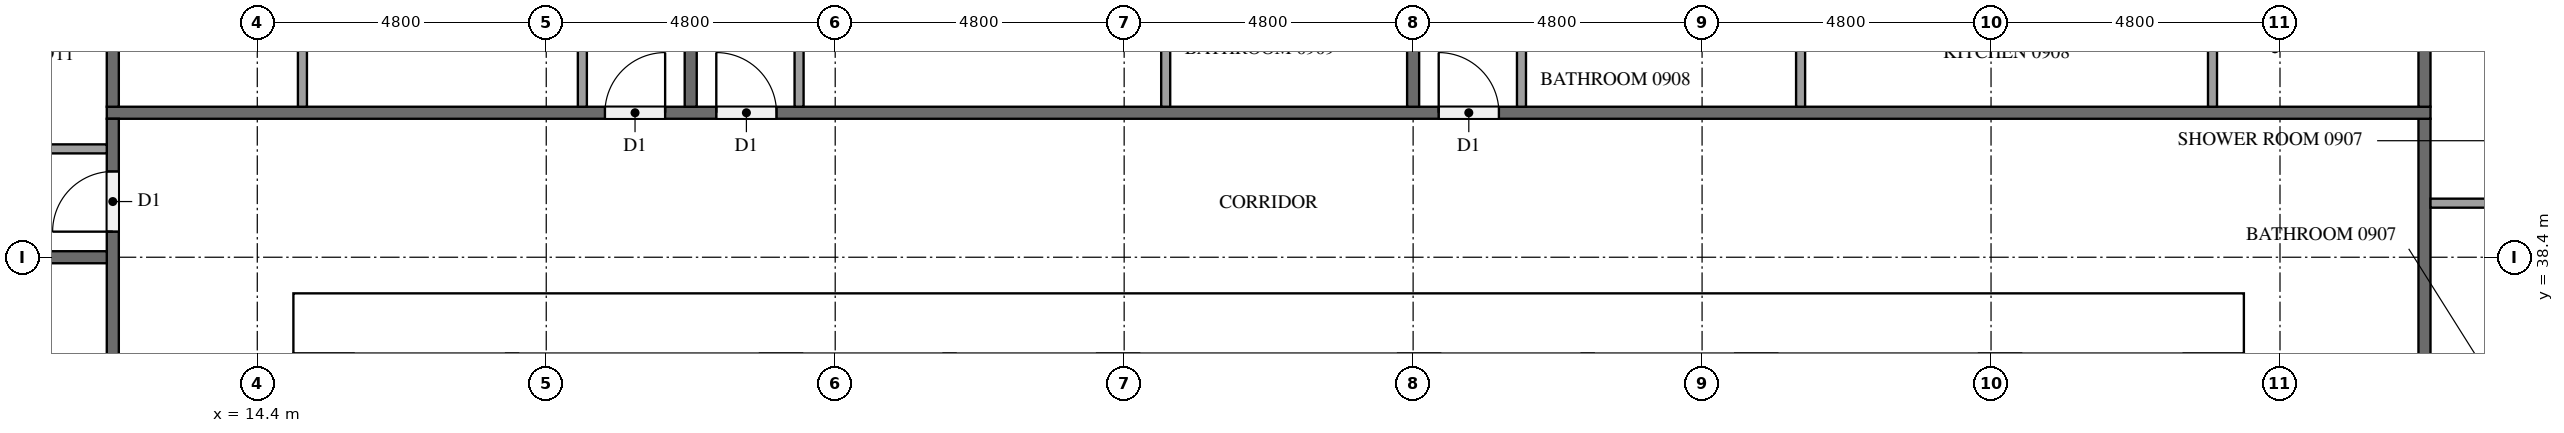
"""IFC4 building model, lengths in metres.
Left out: names, types, materials, properties, quantities, classifications, styles, units other than length and angle.
Written with IfcOpenShell. Run it as: python <this file> out.ifc"""

import sys

from ifc_helpers import new_model, si_unit, direction, frame, frame_2d, origin, place, context, subcontext, project, spatial, rectangle, extrude, element, fill, save


model = new_model("IFC4")
c1 = context("Model", 3, precision=1e-05, world=origin(), true_north=direction((0.0, 1.0)))
c2 = subcontext(c1, "Body", "Model", "MODEL_VIEW")
j1 = project(units=[si_unit("LENGTHUNIT", "METRE"), si_unit("PLANEANGLEUNIT", "RADIAN")], contexts=[c1])
p1 = place(None, origin())
s1 = spatial("IfcSite", under=j1, at=p1, CompositionType="ELEMENT")
p2 = place(p1, origin())
s2 = spatial("IfcBuilding", under=s1, at=p2, CompositionType="ELEMENT")
p3 = place(p2, frame((0.0, 0.0, 39.9)))
s3 = spatial("IfcBuildingStorey", under=s2, at=p3, CompositionType="ELEMENT", Elevation=39.9)
p4 = place(p3, frame((15.0, 37.3, 0.0), z_axis=(0.0, 0.0, 1.0), x_axis=(1.0, 0.0, 0.0)))
e1 = element("IfcWall", 1, at=p4, inside=s3, PredefinedType="SHEAR", context=c2, shape_type="SweptSolid", body=[
    extrude(rectangle(XDim=32.4, YDim=1.0, at=frame_2d((16.2, 0.0))), origin(), (0.0, 0.0, 1.0), 3.2),
])
p5 = place(p4, frame((15.3, 0.0, 0.0)))
e2 = element("IfcOpeningElement", 2, at=p5, cuts=e1, PredefinedType="OPENING", context=c2, shape_type="SweptSolid", body=[
    extrude(rectangle(XDim=1.8, YDim=2.1, at=frame_2d((0.9, 1.05))), frame((0.0, 0.51, 0.0), z_axis=(0.0, -1.0, 0.0), x_axis=(1.0, 0.0, 0.0)), (0.0, 0.0, 1.0), 1.02),
])
p6 = place(p4, frame((1.766, 0.0, 0.0)))
e3 = element("IfcOpeningElement", 3, at=p6, cuts=e1, PredefinedType="OPENING", context=c2, shape_type="SweptSolid", body=[
    extrude(rectangle(XDim=1.0, YDim=2.1, at=frame_2d((0.5, 1.05))), frame((0.0, 0.51, 0.0), z_axis=(0.0, -1.0, 0.0), x_axis=(1.0, 0.0, 0.0)), (0.0, 0.0, 1.0), 1.02),
])
p7 = place(p4, frame((5.241, 0.0, 0.0)))
e4 = element("IfcOpeningElement", 4, at=p7, cuts=e1, PredefinedType="OPENING", context=c2, shape_type="SweptSolid", body=[
    extrude(rectangle(XDim=1.0, YDim=2.1, at=frame_2d((0.5, 1.05))), frame((0.0, 0.51, 0.0), z_axis=(0.0, -1.0, 0.0), x_axis=(1.0, 0.0, 0.0)), (0.0, 0.0, 1.0), 1.02),
])
for number, where, z_axis, x_axis in (
    (5, (28.7, 33.9, 0.0), (0.0, 0.0, 1.0), (0.0, 1.0, 0.0)),
    (6, (33.7, 33.9, 0.0), (0.0, 0.0, 1.0), (0.0, 1.0, 0.0)),
):
    element("IfcWall", number, at=place(p3, frame(where, z_axis=z_axis, x_axis=x_axis)), inside=s3, PredefinedType="SHEAR", context=c2, shape_type="SweptSolid", body=[
        extrude(rectangle(XDim=2.9, YDim=0.7, at=frame_2d((1.45, 0.0))), origin(), (0.0, 0.0, 1.0), 3.2),
    ])
for number, where, z_axis, x_axis in (
    (7, (25.9, 33.9, 0.0), (0.0, 0.0, 1.0), (0.0, 1.0, 0.0)),
    (8, (36.5, 33.9, 0.0), (0.0, 0.0, 1.0), (0.0, 1.0, 0.0)),
):
    element("IfcWall", number, at=place(p3, frame(where, z_axis=z_axis, x_axis=x_axis)), inside=s3, PredefinedType="SOLIDWALL", context=c2, shape_type="SweptSolid", body=[
        extrude(rectangle(XDim=2.9, YDim=0.2, at=frame_2d((1.45, 0.0))), origin(), (0.0, 0.0, 1.0), 3.2),
    ])
p8 = place(p3, frame((18.633, 31.6, 0.0), z_axis=(0.0, 0.0, 1.0), x_axis=(0.0, 1.0, 0.0)))
e9 = element("IfcWall", 9, at=p8, inside=s3, PredefinedType="PARTITIONING", context=c2, shape_type="SweptSolid", body=[
    extrude(rectangle(XDim=5.2, YDim=0.2, at=frame_2d((2.6, 0.0))), origin(), (0.0, 0.0, 1.0), 3.2),
])
p9 = place(p3, frame((50.4, 40.7, 0.0), z_axis=(0.0, 0.0, 1.0), x_axis=(0.0, -1.0, 0.0)))
e10 = element("IfcWall", 10, at=p9, inside=s3, PredefinedType="PARTITIONING", context=c2, shape_type="SweptSolid", body=[
    extrude(rectangle(XDim=28.6, YDim=0.2, at=frame_2d((14.3, 0.0))), origin(), (0.0, 0.0, 1.0), 3.2),
])
p10 = place(p9, frame((17.125, 0.0, 0.0)))
e11 = element("IfcOpeningElement", 11, at=p10, cuts=e10, PredefinedType="OPENING", context=c2, shape_type="SweptSolid", body=[
    extrude(rectangle(XDim=1.0, YDim=2.1, at=frame_2d((0.5, 1.05))), frame((0.0, 0.11, 0.0), z_axis=(0.0, -1.0, 0.0), x_axis=(1.0, 0.0, 0.0)), (0.0, 0.0, 1.0), 0.22),
])
p11 = place(p9, frame((15.275, 0.0, 0.0)))
e12 = element("IfcOpeningElement", 12, at=p11, cuts=e10, PredefinedType="OPENING", context=c2, shape_type="SweptSolid", body=[
    extrude(rectangle(XDim=1.0, YDim=2.1, at=frame_2d((0.5, 1.05))), frame((0.0, 0.11, 0.0), z_axis=(0.0, -1.0, 0.0), x_axis=(1.0, 0.0, 0.0)), (0.0, 0.0, 1.0), 0.22),
])
p12 = place(p9, frame((5.675, 0.0, 0.0)))
e13 = element("IfcOpeningElement", 13, at=p12, cuts=e10, PredefinedType="OPENING", context=c2, shape_type="SweptSolid", body=[
    extrude(rectangle(XDim=1.0, YDim=2.1, at=frame_2d((0.5, 1.05))), frame((0.0, 0.11, 0.0), z_axis=(0.0, -1.0, 0.0), x_axis=(1.0, 0.0, 0.0)), (0.0, 0.0, 1.0), 0.22),
])
p13 = place(p3, frame((11.9, 40.8, 0.0), z_axis=(0.0, 0.0, 1.0), x_axis=(1.0, 0.0, 0.0)))
e14 = element("IfcWall", 14, at=p13, inside=s3, PredefinedType="PARTITIONING", context=c2, shape_type="SweptSolid", body=[
    extrude(rectangle(XDim=38.6, YDim=0.2, at=frame_2d((19.3, 0.0))), origin(), (0.0, 0.0, 1.0), 3.2),
])
p14 = place(p13, frame((22.125, 0.0, 0.0)))
e15 = element("IfcOpeningElement", 15, at=p14, cuts=e14, PredefinedType="OPENING", context=c2, shape_type="SweptSolid", body=[
    extrude(rectangle(XDim=1.0, YDim=2.1, at=frame_2d((0.5, 1.05))), frame((0.0, 0.11, 0.0), z_axis=(0.0, -1.0, 0.0), x_axis=(1.0, 0.0, 0.0)), (0.0, 0.0, 1.0), 0.22),
])
p15 = place(p13, frame((10.125, 0.0, 0.0)))
e16 = element("IfcOpeningElement", 16, at=p15, cuts=e14, PredefinedType="OPENING", context=c2, shape_type="SweptSolid", body=[
    extrude(rectangle(XDim=1.0, YDim=2.1, at=frame_2d((0.5, 1.05))), frame((0.0, 0.11, 0.0), z_axis=(0.0, -1.0, 0.0), x_axis=(1.0, 0.0, 0.0)), (0.0, 0.0, 1.0), 0.22),
])
p16 = place(p13, frame((8.275, 0.0, 0.0)))
e17 = element("IfcOpeningElement", 17, at=p16, cuts=e14, PredefinedType="OPENING", context=c2, shape_type="SweptSolid", body=[
    extrude(rectangle(XDim=1.0, YDim=2.1, at=frame_2d((0.5, 1.05))), frame((0.0, 0.11, 0.0), z_axis=(0.0, -1.0, 0.0), x_axis=(1.0, 0.0, 0.0)), (0.0, 0.0, 1.0), 0.22),
])
p17 = place(p3, frame((12.0, 12.1, 0.0), z_axis=(0.0, 0.0, 1.0), x_axis=(0.0, 1.0, 0.0)))
e18 = element("IfcWall", 18, at=p17, inside=s3, PredefinedType="PARTITIONING", context=c2, shape_type="SweptSolid", body=[
    extrude(rectangle(XDim=28.6, YDim=0.2, at=frame_2d((14.3, 0.0))), origin(), (0.0, 0.0, 1.0), 3.2),
])
p18 = place(p17, frame((26.725, 0.0, 0.0)))
e19 = element("IfcOpeningElement", 19, at=p18, cuts=e18, PredefinedType="OPENING", context=c2, shape_type="SweptSolid", body=[
    extrude(rectangle(XDim=1.0, YDim=2.1, at=frame_2d((0.5, 1.05))), frame((0.0, 0.11, 0.0), z_axis=(0.0, -1.0, 0.0), x_axis=(1.0, 0.0, 0.0)), (0.0, 0.0, 1.0), 0.22),
])
p19 = place(p17, frame((17.125, 0.0, 0.0)))
e20 = element("IfcOpeningElement", 20, at=p19, cuts=e18, PredefinedType="OPENING", context=c2, shape_type="SweptSolid", body=[
    extrude(rectangle(XDim=1.0, YDim=2.1, at=frame_2d((0.5, 1.05))), frame((0.0, 0.11, 0.0), z_axis=(0.0, -1.0, 0.0), x_axis=(1.0, 0.0, 0.0)), (0.0, 0.0, 1.0), 0.22),
])
p20 = place(p17, frame((15.275, 0.0, 0.0)))
e21 = element("IfcOpeningElement", 21, at=p20, cuts=e18, PredefinedType="OPENING", context=c2, shape_type="SweptSolid", body=[
    extrude(rectangle(XDim=1.0, YDim=2.1, at=frame_2d((0.5, 1.05))), frame((0.0, 0.11, 0.0), z_axis=(0.0, -1.0, 0.0), x_axis=(1.0, 0.0, 0.0)), (0.0, 0.0, 1.0), 0.22),
])
p21 = place(p17, frame((5.675, 0.0, 0.0)))
e22 = element("IfcOpeningElement", 22, at=p21, cuts=e18, PredefinedType="OPENING", context=c2, shape_type="SweptSolid", body=[
    extrude(rectangle(XDim=1.0, YDim=2.1, at=frame_2d((0.5, 1.05))), frame((0.0, 0.11, 0.0), z_axis=(0.0, -1.0, 0.0), x_axis=(1.0, 0.0, 0.0)), (0.0, 0.0, 1.0), 0.22),
])
p22 = place(p3, frame((50.4, 40.9, 0.0), z_axis=(0.0, 0.0, 1.0), x_axis=(0.0, 1.0, 0.0)))
e23 = element("IfcWall", 23, at=p22, inside=s3, PredefinedType="PARTITIONING", context=c2, shape_type="SweptSolid", body=[
    extrude(rectangle(XDim=7.0, YDim=0.2, at=frame_2d((3.5, 0.0))), origin(), (0.0, 0.0, 1.0), 3.2),
])
p23 = place(p3, frame((33.6, 47.55, 0.0), z_axis=(0.0, 0.0, 1.0), x_axis=(0.0, -1.0, 0.0)))
e24 = element("IfcWall", 24, at=p23, inside=s3, PredefinedType="PARTITIONING", context=c2, shape_type="SweptSolid", body=[
    extrude(rectangle(XDim=6.65, YDim=0.2, at=frame_2d((3.325, 0.0))), origin(), (0.0, 0.0, 1.0), 3.2),
])
for number, where, z_axis, x_axis in (
    (25, (21.6, 47.9, 0.0), (0.0, 0.0, 1.0), (0.0, -1.0, 0.0)),
    (26, (12.0, 47.9, 0.0), (0.0, 0.0, 1.0), (0.0, -1.0, 0.0)),
):
    element("IfcWall", number, at=place(p3, frame(where, z_axis=z_axis, x_axis=x_axis)), inside=s3, PredefinedType="PARTITIONING", context=c2, shape_type="SweptSolid", body=[
        extrude(rectangle(XDim=7.0, YDim=0.2, at=frame_2d((3.5, 0.0))), origin(), (0.0, 0.0, 1.0), 3.2),
    ])
p24 = place(p3, frame((0.1, 38.4, 0.0), z_axis=(0.0, 0.0, 1.0), x_axis=(1.0, 0.0, 0.0)))
e27 = element("IfcWall", 27, at=p24, inside=s3, PredefinedType="PARTITIONING", context=c2, shape_type="SweptSolid", body=[
    extrude(rectangle(XDim=11.8, YDim=0.2, at=frame_2d((5.9, 0.0))), origin(), (0.0, 0.0, 1.0), 3.2),
])
p25 = place(p3, frame((50.5, 39.298, 0.0), z_axis=(0.0, 0.0, 1.0), x_axis=(1.0, 0.0, 0.0)))
e28 = element("IfcWall", 28, at=p25, inside=s3, PredefinedType="PARTITIONING", context=c2, shape_type="SweptSolid", body=[
    extrude(rectangle(XDim=1.925, YDim=0.15, at=frame_2d((0.962, 0.0))), origin(), (0.0, 0.0, 1.0), 3.2),
])
for number, where, z_axis, x_axis in (
    (29, (40.037, 40.9, 0.0), (0.0, 0.0, 1.0), (0.0, 1.0, 0.0)),
    (30, (46.879, 40.9, 0.0), (0.0, 0.0, 1.0), (0.0, 1.0, 0.0)),
):
    element("IfcWall", number, at=place(p3, frame(where, z_axis=z_axis, x_axis=x_axis)), inside=s3, PredefinedType="PARTITIONING", context=c2, shape_type="SweptSolid", body=[
        extrude(rectangle(XDim=1.775, YDim=0.15, at=frame_2d((0.888, 0.0))), origin(), (0.0, 0.0, 1.0), 3.2),
    ])
p26 = place(p3, frame((35.4, 40.9, 0.0), z_axis=(0.0, 0.0, 1.0), x_axis=(0.0, 1.0, 0.0)))
e31 = element("IfcWall", 31, at=p26, inside=s3, PredefinedType="PARTITIONING", context=c2, shape_type="SweptSolid", body=[
    extrude(rectangle(XDim=1.925, YDim=0.15, at=frame_2d((0.962, 0.0))), origin(), (0.0, 0.0, 1.0), 3.2),
])
p27 = place(p3, frame((29.49, 40.9, 0.0), z_axis=(0.0, 0.0, 1.0), x_axis=(0.0, 1.0, 0.0)))
e32 = element("IfcWall", 32, at=p27, inside=s3, PredefinedType="PARTITIONING", context=c2, shape_type="SweptSolid", body=[
    extrude(rectangle(XDim=2.225, YDim=0.15, at=frame_2d((1.113, 0.0))), origin(), (0.0, 0.0, 1.0), 3.2),
])
p28 = place(p3, frame((23.4, 40.9, 0.0), z_axis=(0.0, 0.0, 1.0), x_axis=(0.0, 1.0, 0.0)))
e33 = element("IfcWall", 33, at=p28, inside=s3, PredefinedType="PARTITIONING", context=c2, shape_type="SweptSolid", body=[
    extrude(rectangle(XDim=2.375, YDim=0.15, at=frame_2d((1.188, 0.0))), origin(), (0.0, 0.0, 1.0), 3.2),
])
p29 = place(p3, frame((15.15, 40.9, 0.0), z_axis=(0.0, 0.0, 1.0), x_axis=(0.0, 1.0, 0.0)))
e34 = element("IfcWall", 34, at=p29, inside=s3, PredefinedType="PARTITIONING", context=c2, shape_type="SweptSolid", body=[
    extrude(rectangle(XDim=2.075, YDim=0.15, at=frame_2d((1.038, 0.0))), origin(), (0.0, 0.0, 1.0), 3.2),
])
p30 = place(p3, frame((19.8, 40.9, 0.0), z_axis=(0.0, 0.0, 1.0), x_axis=(0.0, 1.0, 0.0)))
e35 = element("IfcWall", 35, at=p30, inside=s3, PredefinedType="PARTITIONING", context=c2, shape_type="SweptSolid", body=[
    extrude(rectangle(XDim=2.225, YDim=0.15, at=frame_2d((1.113, 0.0))), origin(), (0.0, 0.0, 1.0), 3.2),
])
p31 = place(p3, frame((11.9, 40.2, 0.0), z_axis=(0.0, 0.0, 1.0), x_axis=(-1.0, 0.0, 0.0)))
e36 = element("IfcWall", 36, at=p31, inside=s3, PredefinedType="PARTITIONING", context=c2, shape_type="SweptSolid", body=[
    extrude(rectangle(XDim=3.425, YDim=0.15, at=frame_2d((1.712, 0.0))), origin(), (0.0, 0.0, 1.0), 3.2),
])
p32 = place(p5, origin())
e37 = element("IfcDoor", 37, at=p32, inside=s3, OperationType="DOUBLE_DOOR_SINGLE_SWING", PredefinedType="DOOR", context=c2, shape_type="SweptSolid", body=[
    extrude(rectangle(XDim=1.8, YDim=2.1, at=frame_2d((0.9, 1.05))), frame((0.0, 0.025, 0.0), z_axis=(0.0, -1.0, 0.0), x_axis=(1.0, 0.0, 0.0)), (0.0, 0.0, 1.0), 0.05),
])
fill(e2, e37)
p33 = place(p6, origin())
e38 = element("IfcDoor", 38, at=p33, inside=s3, OperationType="SINGLE_SWING_RIGHT", PredefinedType="DOOR", context=c2, shape_type="SweptSolid", body=[
    extrude(rectangle(XDim=1.0, YDim=2.1, at=frame_2d((0.5, 1.05))), frame((0.0, 0.025, 0.0), z_axis=(0.0, -1.0, 0.0), x_axis=(1.0, 0.0, 0.0)), (0.0, 0.0, 1.0), 0.05),
])
fill(e3, e38)
p34 = place(p7, origin())
e39 = element("IfcDoor", 39, at=p34, inside=s3, OperationType="SINGLE_SWING_LEFT", PredefinedType="DOOR", context=c2, shape_type="SweptSolid", body=[
    extrude(rectangle(XDim=1.0, YDim=2.1, at=frame_2d((0.5, 1.05))), frame((0.0, 0.025, 0.0), z_axis=(0.0, -1.0, 0.0), x_axis=(1.0, 0.0, 0.0)), (0.0, 0.0, 1.0), 0.05),
])
fill(e4, e39)
p35 = place(p14, origin())
e40 = element("IfcDoor", 40, at=p35, inside=s3, OperationType="SINGLE_SWING_LEFT", PredefinedType="DOOR", context=c2, shape_type="SweptSolid", body=[
    extrude(rectangle(XDim=1.0, YDim=2.1, at=frame_2d((0.5, 1.05))), frame((0.0, 0.025, 0.0), z_axis=(0.0, -1.0, 0.0), x_axis=(1.0, 0.0, 0.0)), (0.0, 0.0, 1.0), 0.05),
])
fill(e15, e40)
p36 = place(p15, origin())
e41 = element("IfcDoor", 41, at=p36, inside=s3, OperationType="SINGLE_SWING_LEFT", PredefinedType="DOOR", context=c2, shape_type="SweptSolid", body=[
    extrude(rectangle(XDim=1.0, YDim=2.1, at=frame_2d((0.5, 1.05))), frame((0.0, 0.025, 0.0), z_axis=(0.0, -1.0, 0.0), x_axis=(1.0, 0.0, 0.0)), (0.0, 0.0, 1.0), 0.05),
])
fill(e16, e41)
p37 = place(p16, origin())
e42 = element("IfcDoor", 42, at=p37, inside=s3, OperationType="SINGLE_SWING_RIGHT", PredefinedType="DOOR", context=c2, shape_type="SweptSolid", body=[
    extrude(rectangle(XDim=1.0, YDim=2.1, at=frame_2d((0.5, 1.05))), frame((0.0, 0.025, 0.0), z_axis=(0.0, -1.0, 0.0), x_axis=(1.0, 0.0, 0.0)), (0.0, 0.0, 1.0), 0.05),
])
fill(e17, e42)
p38 = place(p18, origin())
e43 = element("IfcDoor", 43, at=p38, inside=s3, OperationType="SINGLE_SWING_LEFT", PredefinedType="DOOR", context=c2, shape_type="SweptSolid", body=[
    extrude(rectangle(XDim=1.0, YDim=2.1, at=frame_2d((0.5, 1.05))), frame((0.0, 0.025, 0.0), z_axis=(0.0, -1.0, 0.0), x_axis=(1.0, 0.0, 0.0)), (0.0, 0.0, 1.0), 0.05),
])
fill(e19, e43)
save(model, sys.argv[1])
